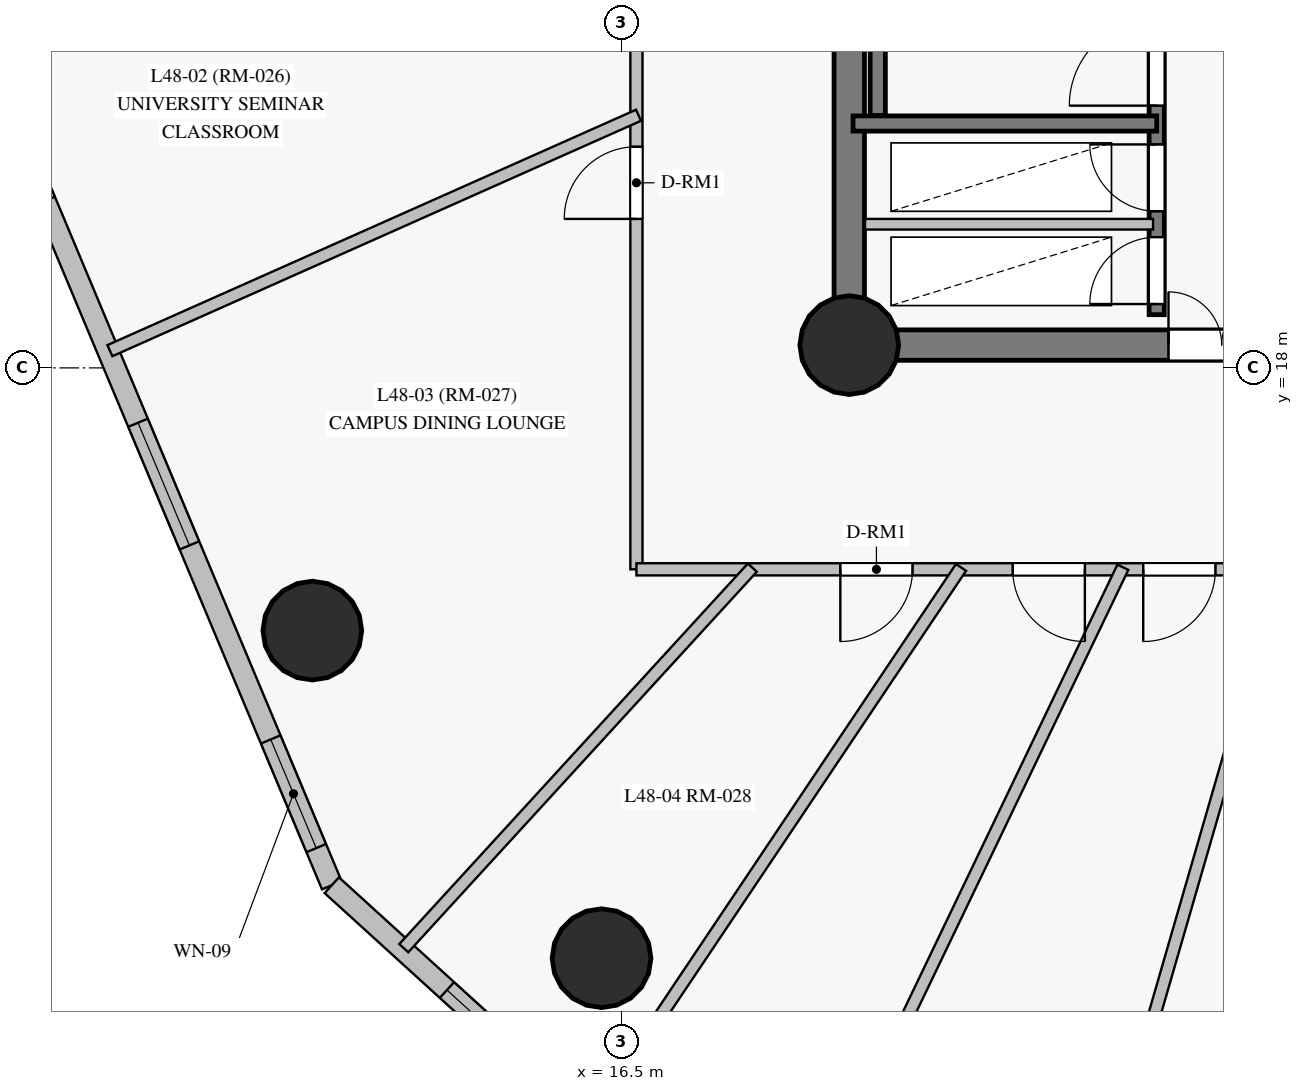
"""IFC4 building model, lengths in metres.
Left out: names, types, materials, properties, quantities, classifications, styles, units other than length and angle.
Written with IfcOpenShell. Run it as: python <this file> out.ifc"""

import sys

from ifc_helpers import new_model, si_unit, direction, frame, frame_2d, origin, origin_with_axes, origin_2d, place, context, subcontext, project, spatial, rectangle, circle, extrude, source, transform, mapped, element, fill, save


model = new_model("IFC4")
c1 = context("Model", 3, precision=1e-05, world=origin(), true_north=direction((0.0, 1.0)))
c2 = subcontext(c1, "Body", "Model", "MODEL_VIEW")
j1 = project(units=[si_unit("LENGTHUNIT", "METRE"), si_unit("PLANEANGLEUNIT", "RADIAN")], contexts=[c1])
p1 = place(None, origin())
s1 = spatial("IfcSite", under=j1, at=p1, CompositionType="ELEMENT")
p2 = place(p1, origin())
s2 = spatial("IfcBuilding", under=s1, at=p2, CompositionType="ELEMENT")
p3 = place(p2, frame((0.0, 0.0, 168.75)))
s3 = spatial("IfcBuildingStorey", under=s2, at=p3, CompositionType="ELEMENT", Elevation=168.75)
p4 = place(p3, frame((19.5, 18.3, 0.0), z_axis=(0.0, 0.0, 1.0), x_axis=(1.0, 0.0, 0.0)))
e1 = element("IfcWall", 1, at=p4, inside=s3, PredefinedType="SHEAR", context=c2, shape_type="SweptSolid", body=[
    extrude(rectangle(XDim=7.05, YDim=0.4, at=frame_2d((3.525, 0.0))), origin(), (0.0, 0.0, 1.0), 2.825),
])
p5 = place(p4, frame((4.2, 0.0, 0.0)))
e2 = element("IfcOpeningElement", 2, at=p5, cuts=e1, PredefinedType="OPENING", context=c2, shape_type="SweptSolid", body=[
    extrude(rectangle(XDim=1.4, YDim=2.2, at=frame_2d((0.7, 1.1))), frame((0.0, 0.21, 0.0), z_axis=(0.0, -1.0, 0.0), x_axis=(1.0, 0.0, 0.0)), (0.0, 0.0, 1.0), 0.42),
])
p6 = place(p3, frame((19.5, 34.7, 0.0), z_axis=(0.0, 0.0, 1.0), x_axis=(0.0, -1.0, 0.0)))
e3 = element("IfcWall", 3, at=p6, inside=s3, PredefinedType="SHEAR", context=c2, shape_type="SweptSolid", body=[
    extrude(rectangle(XDim=16.4, YDim=0.4, at=frame_2d((8.2, 0.0))), origin(), (0.0, 0.0, 1.0), 2.825),
])
p7 = place(p6, frame((3.1, 0.0, 0.0)))
e4 = element("IfcOpeningElement", 4, at=p7, cuts=e3, PredefinedType="OPENING", context=c2, shape_type="SweptSolid", body=[
    extrude(rectangle(XDim=1.1, YDim=2.15, at=frame_2d((0.55, 1.075))), frame((0.0, 0.21, 0.0), z_axis=(0.0, -1.0, 0.0), x_axis=(1.0, 0.0, 0.0)), (0.0, 0.0, 1.0), 0.42),
])
m1 = source(origin_with_axes(), c2, "Body", "SweptSolid", [
    extrude(circle(Radius=0.65, at=origin_2d()), origin(), (0.0, 0.0, 1.0), 3.05),
])
for number, where, z_axis, x_axis in (
    (5, (19.5, 18.3, 0.0), (0.0, 0.0, 1.0), (1.0, 0.0, 0.0)),
    (6, (12.436, 14.544, 0.0), (0.0, 0.0, 1.0), (1.0, 0.0, 0.0)),
    (7, (16.241, 10.234, 0.0), (0.0, 0.0, 1.0), (1.0, 0.0, 0.0)),
):
    element("IfcColumn", number, at=place(p3, frame(where, z_axis=z_axis, x_axis=x_axis)), inside=s3, PredefinedType="COLUMN", context=c2, shape_type="MappedRepresentation", body=[
        mapped(m1, transform((0.0, 0.0, 0.0), scale=1.0)),
    ])
p8 = place(p3, frame((7.391, 23.846, 0.0), z_axis=(0.0, 0.0, 1.0), x_axis=(0.386420521241, -0.922322709665, 0.0)))
e8 = element("IfcWall", 8, at=p8, inside=s3, PredefinedType="SOLIDWALL", context=c2, shape_type="SweptSolid", body=[
    extrude(rectangle(XDim=13.718, YDim=0.28, at=frame_2d((6.859, 0.0))), origin(), (0.0, 0.0, 1.0), 2.825),
])
p9 = place(p8, frame((2.206, 0.0, 0.85)))
e9 = element("IfcOpeningElement", 9, at=p9, cuts=e8, PredefinedType="OPENING", context=c2, shape_type="SweptSolid", body=[
    extrude(rectangle(XDim=1.75, YDim=1.65, at=frame_2d((0.875, 0.825))), frame((0.0, 0.15, 0.0), z_axis=(0.0, -1.0, 0.0), x_axis=(1.0, 0.0, 0.0)), (0.0, 0.0, 1.0), 0.3),
])
p10 = place(p8, frame((7.121, 0.0, 0.85)))
e10 = element("IfcOpeningElement", 10, at=p10, cuts=e8, PredefinedType="OPENING", context=c2, shape_type="SweptSolid", body=[
    extrude(rectangle(XDim=1.75, YDim=1.65, at=frame_2d((0.875, 0.825))), frame((0.0, 0.15, 0.0), z_axis=(0.0, -1.0, 0.0), x_axis=(1.0, 0.0, 0.0)), (0.0, 0.0, 1.0), 0.3),
])
p11 = place(p8, frame((11.638, 0.0, 0.85)))
e11 = element("IfcOpeningElement", 11, at=p11, cuts=e8, PredefinedType="OPENING", context=c2, shape_type="SweptSolid", body=[
    extrude(rectangle(XDim=1.55, YDim=1.65, at=frame_2d((0.775, 0.825))), frame((0.0, 0.15, 0.0), z_axis=(0.0, -1.0, 0.0), x_axis=(1.0, 0.0, 0.0)), (0.0, 0.0, 1.0), 0.3),
])
p12 = place(p3, frame((12.692, 11.194, 0.0), z_axis=(0.0, 0.0, 1.0), x_axis=(0.739668886852, -0.67297097844, 0.0)))
e12 = element("IfcWall", 12, at=p12, inside=s3, PredefinedType="SOLIDWALL", context=c2, shape_type="SweptSolid", body=[
    extrude(rectangle(XDim=9.616, YDim=0.28, at=frame_2d((4.808, 0.0))), origin(), (0.0, 0.0, 1.0), 2.825),
])
p13 = place(p12, frame((2.049, 0.0, 0.85)))
e13 = element("IfcOpeningElement", 13, at=p13, cuts=e12, PredefinedType="OPENING", context=c2, shape_type="SweptSolid", body=[
    extrude(rectangle(XDim=1.75, YDim=1.65, at=frame_2d((0.875, 0.825))), frame((0.0, 0.15, 0.0), z_axis=(0.0, -1.0, 0.0), x_axis=(1.0, 0.0, 0.0)), (0.0, 0.0, 1.0), 0.3),
])
p14 = place(p12, frame((5.365, 0.0, 0.85)))
e14 = element("IfcOpeningElement", 14, at=p14, cuts=e12, PredefinedType="OPENING", context=c2, shape_type="SweptSolid", body=[
    extrude(rectangle(XDim=1.75, YDim=1.65, at=frame_2d((0.875, 0.825))), frame((0.0, 0.15, 0.0), z_axis=(0.0, -1.0, 0.0), x_axis=(1.0, 0.0, 0.0)), (0.0, 0.0, 1.0), 0.3),
])
p15 = place(p3, frame((23.545, 18.7, 0.0), z_axis=(0.0, 0.0, 1.0), x_axis=(0.0, 1.0, 0.0)))
e15 = element("IfcWall", 15, at=p15, inside=s3, PredefinedType="SHEAR", context=c2, shape_type="SweptSolid", body=[
    extrude(rectangle(XDim=15.6, YDim=0.2, at=frame_2d((7.8, 0.0))), origin(), (0.0, 0.0, 1.0), 2.825),
])
p16 = place(p15, frame((2.75, 0.0, 0.0)))
e16 = element("IfcOpeningElement", 16, at=p16, cuts=e15, PredefinedType="OPENING", context=c2, shape_type="SweptSolid", body=[
    extrude(rectangle(XDim=1.15, YDim=2.15, at=frame_2d((0.575, 1.075))), frame((0.0, 0.11, 0.0), z_axis=(0.0, -1.0, 0.0), x_axis=(1.0, 0.0, 0.0)), (0.0, 0.0, 1.0), 0.22),
])
p17 = place(p15, frame((0.14, 0.0, 0.0)))
e17 = element("IfcOpeningElement", 17, at=p17, cuts=e15, PredefinedType="OPENING", context=c2, shape_type="SweptSolid", body=[
    extrude(rectangle(XDim=0.88, YDim=2.1, at=frame_2d((0.44, 1.05))), frame((0.0, 0.11, 0.0), z_axis=(0.0, -1.0, 0.0), x_axis=(1.0, 0.0, 0.0)), (0.0, 0.0, 1.0), 0.22),
])
p18 = place(p15, frame((1.36, 0.0, 0.0)))
e18 = element("IfcOpeningElement", 18, at=p18, cuts=e15, PredefinedType="OPENING", context=c2, shape_type="SweptSolid", body=[
    extrude(rectangle(XDim=0.88, YDim=2.1, at=frame_2d((0.44, 1.05))), frame((0.0, 0.11, 0.0), z_axis=(0.0, -1.0, 0.0), x_axis=(1.0, 0.0, 0.0)), (0.0, 0.0, 1.0), 0.22),
])
p19 = place(p15, frame((12.1, 0.0, 0.0)))
e19 = element("IfcOpeningElement", 19, at=p19, cuts=e15, PredefinedType="OPENING", context=c2, shape_type="SweptSolid", body=[
    extrude(rectangle(XDim=1.12, YDim=2.15, at=frame_2d((0.56, 1.075))), frame((0.0, 0.11, 0.0), z_axis=(0.0, -1.0, 0.0), x_axis=(1.0, 0.0, 0.0)), (0.0, 0.0, 1.0), 0.22),
])
p20 = place(p15, frame((14.05, 0.0, 0.0)))
e20 = element("IfcOpeningElement", 20, at=p20, cuts=e15, PredefinedType="OPENING", context=c2, shape_type="SweptSolid", body=[
    extrude(rectangle(XDim=1.12, YDim=2.15, at=frame_2d((0.56, 1.075))), frame((0.0, 0.11, 0.0), z_axis=(0.0, -1.0, 0.0), x_axis=(1.0, 0.0, 0.0)), (0.0, 0.0, 1.0), 0.22),
])
p21 = place(p3, frame((19.875, 21.32, 0.0), z_axis=(0.0, 0.0, 1.0), x_axis=(0.0, 1.0, 0.0)))
e21 = element("IfcWall", 21, at=p21, inside=s3, PredefinedType="SHEAR", context=c2, shape_type="SweptSolid", body=[
    extrude(rectangle(XDim=7.5, YDim=0.2, at=frame_2d((3.75, 0.0))), origin(), (0.0, 0.0, 1.0), 2.825),
])
p22 = place(p3, frame((19.55, 21.215, 0.0), z_axis=(0.0, 0.0, 1.0), x_axis=(1.0, 0.0, 0.0)))
e22 = element("IfcWall", 22, at=p22, inside=s3, PredefinedType="SHEAR", context=c2, shape_type="SweptSolid", body=[
    extrude(rectangle(XDim=3.995, YDim=0.2, at=frame_2d((1.998, 0.0))), origin(), (0.0, 0.0, 1.0), 2.825),
])
p23 = place(p3, frame((16.7, 15.35, 0.0), z_axis=(0.0, 0.0, 1.0), x_axis=(0.0, 1.0, 0.0)))
e23 = element("IfcWall", 23, at=p23, inside=s3, PredefinedType="PARTITIONING", context=c2, shape_type="SweptSolid", body=[
    extrude(rectangle(XDim=22.3, YDim=0.16, at=frame_2d((11.15, 0.0))), origin(), (0.0, 0.0, 1.0), 2.275),
])
p24 = place(p23, frame((11.383, 0.0, 0.0)))
e24 = element("IfcOpeningElement", 24, at=p24, cuts=e23, PredefinedType="OPENING", context=c2, shape_type="SweptSolid", body=[
    extrude(rectangle(XDim=0.86, YDim=2.1, at=frame_2d((0.43, 1.05))), frame((0.0, 0.09, 0.0), z_axis=(0.0, -1.0, 0.0), x_axis=(1.0, 0.0, 0.0)), (0.0, 0.0, 1.0), 0.18),
])
p25 = place(p23, frame((7.33, 0.0, 0.0)))
e25 = element("IfcOpeningElement", 25, at=p25, cuts=e23, PredefinedType="OPENING", context=c2, shape_type="SweptSolid", body=[
    extrude(rectangle(XDim=0.96, YDim=2.15, at=frame_2d((0.48, 1.075))), frame((0.0, 0.09, 0.0), z_axis=(0.0, -1.0, 0.0), x_axis=(1.0, 0.0, 0.0)), (0.0, 0.0, 1.0), 0.18),
])
p26 = place(p23, frame((4.61, 0.0, 0.0)))
e26 = element("IfcOpeningElement", 26, at=p26, cuts=e23, PredefinedType="OPENING", context=c2, shape_type="SweptSolid", body=[
    extrude(rectangle(XDim=0.95, YDim=2.15, at=frame_2d((0.475, 1.075))), frame((0.0, 0.09, 0.0), z_axis=(0.0, -1.0, 0.0), x_axis=(1.0, 0.0, 0.0)), (0.0, 0.0, 1.0), 0.18),
])
p27 = place(p23, frame((16.99, 0.0, 0.0)))
e27 = element("IfcOpeningElement", 27, at=p27, cuts=e23, PredefinedType="OPENING", context=c2, shape_type="SweptSolid", body=[
    extrude(rectangle(XDim=0.95, YDim=2.15, at=frame_2d((0.475, 1.075))), frame((0.0, 0.09, 0.0), z_axis=(0.0, -1.0, 0.0), x_axis=(1.0, 0.0, 0.0)), (0.0, 0.0, 1.0), 0.18),
])
p28 = place(p23, frame((15.86, 0.0, 0.0)))
e28 = element("IfcOpeningElement", 28, at=p28, cuts=e23, PredefinedType="OPENING", context=c2, shape_type="SweptSolid", body=[
    extrude(rectangle(XDim=0.95, YDim=2.15, at=frame_2d((0.475, 1.075))), frame((0.0, 0.09, 0.0), z_axis=(0.0, -1.0, 0.0), x_axis=(1.0, 0.0, 0.0)), (0.0, 0.0, 1.0), 0.18),
])
p29 = place(p23, frame((14.02, 0.0, 0.0)))
e29 = element("IfcOpeningElement", 29, at=p29, cuts=e23, PredefinedType="OPENING", context=c2, shape_type="SweptSolid", body=[
    extrude(rectangle(XDim=0.95, YDim=2.15, at=frame_2d((0.475, 1.075))), frame((0.0, 0.09, 0.0), z_axis=(0.0, -1.0, 0.0), x_axis=(1.0, 0.0, 0.0)), (0.0, 0.0, 1.0), 0.18),
])
p30 = place(p3, frame((26.493, 15.38, 0.0), z_axis=(0.0, 0.0, 1.0), x_axis=(-0.172341150269, -0.985037323112, 0.0)))
e30 = element("IfcWall", 30, at=p30, inside=s3, PredefinedType="PARTITIONING", context=c2, shape_type="SweptSolid", body=[
    extrude(rectangle(XDim=11.941, YDim=0.16, at=frame_2d((5.97, 0.0))), origin(), (0.0, 0.0, 1.0), 2.275),
])
p31 = place(p30, frame((5.54, 0.0, 0.0)))
e31 = element("IfcOpeningElement", 31, at=p31, cuts=e30, PredefinedType="OPENING", context=c2, shape_type="SweptSolid", body=[
    extrude(rectangle(XDim=0.86, YDim=2.04, at=frame_2d((0.43, 1.02))), frame((0.0, 0.09, 0.0), z_axis=(0.0, -1.0, 0.0), x_axis=(1.0, 0.0, 0.0)), (0.0, 0.0, 1.0), 0.18),
])
p32 = place(p3, frame((25.219, 15.379, 0.0), z_axis=(0.0, 0.0, 1.0), x_axis=(-0.277990744835, -0.960583752614, 0.0)))
e32 = element("IfcWall", 32, at=p32, inside=s3, PredefinedType="PARTITIONING", context=c2, shape_type="SweptSolid", body=[
    extrude(rectangle(XDim=11.622, YDim=0.16, at=frame_2d((5.811, 0.0))), origin(), (0.0, 0.0, 1.0), 2.825),
])
p33 = place(p3, frame((27.55, 15.35, 0.0), z_axis=(0.0, 0.0, 1.0), x_axis=(-1.0, 0.0, 0.0)))
e33 = element("IfcWall", 33, at=p33, inside=s3, PredefinedType="PARTITIONING", context=c2, shape_type="SweptSolid", body=[
    extrude(rectangle(XDim=10.85, YDim=0.16, at=frame_2d((5.425, 0.0))), origin(), (0.0, 0.0, 1.0), 2.375),
])
p34 = place(p33, frame((7.218, 0.0, 0.0)))
e34 = element("IfcOpeningElement", 34, at=p34, cuts=e33, PredefinedType="OPENING", context=c2, shape_type="SweptSolid", body=[
    extrude(rectangle(XDim=0.95, YDim=2.15, at=frame_2d((0.475, 1.075))), frame((0.0, 0.09, 0.0), z_axis=(0.0, -1.0, 0.0), x_axis=(1.0, 0.0, 0.0)), (0.0, 0.0, 1.0), 0.18),
])
p35 = place(p33, frame((4.95, 0.0, 0.0)))
e35 = element("IfcOpeningElement", 35, at=p35, cuts=e33, PredefinedType="OPENING", context=c2, shape_type="SweptSolid", body=[
    extrude(rectangle(XDim=0.95, YDim=2.15, at=frame_2d((0.475, 1.075))), frame((0.0, 0.09, 0.0), z_axis=(0.0, -1.0, 0.0), x_axis=(1.0, 0.0, 0.0)), (0.0, 0.0, 1.0), 0.18),
])
p36 = place(p33, frame((3.232, 0.0, 0.0)))
e36 = element("IfcOpeningElement", 36, at=p36, cuts=e33, PredefinedType="OPENING", context=c2, shape_type="SweptSolid", body=[
    extrude(rectangle(XDim=0.95, YDim=2.15, at=frame_2d((0.475, 1.075))), frame((0.0, 0.09, 0.0), z_axis=(0.0, -1.0, 0.0), x_axis=(1.0, 0.0, 0.0)), (0.0, 0.0, 1.0), 0.18),
])
p37 = place(p3, frame((23.1, 15.377, 0.0), z_axis=(0.0, 0.0, 1.0), x_axis=(-0.432373169731, -0.901694761045, 0.0)))
e37 = element("IfcWall", 37, at=p37, inside=s3, PredefinedType="PARTITIONING", context=c2, shape_type="SweptSolid", body=[
    extrude(rectangle(XDim=10.513, YDim=0.16, at=frame_2d((5.256, 0.0))), origin(), (0.0, 0.0, 1.0), 2.825),
])
p38 = place(p3, frame((20.97, 15.375, 0.0), z_axis=(0.0, 0.0, 1.0), x_axis=(-0.556788758436, -0.830654126866, 0.0)))
e38 = element("IfcWall", 38, at=p38, inside=s3, PredefinedType="PARTITIONING", context=c2, shape_type="SweptSolid", body=[
    extrude(rectangle(XDim=8.733, YDim=0.16, at=frame_2d((4.366, 0.0))), origin(), (0.0, 0.0, 1.0), 2.825),
])
p39 = place(p3, frame((16.727, 21.323, 0.0), z_axis=(0.0, 0.0, 1.0), x_axis=(-0.913525664491, -0.406781096311, 0.0)))
e39 = element("IfcWall", 39, at=p39, inside=s3, PredefinedType="PARTITIONING", context=c2, shape_type="SweptSolid", body=[
    extrude(rectangle(XDim=7.613, YDim=0.16, at=frame_2d((3.806, 0.0))), origin(), (0.0, 0.0, 1.0), 2.825),
])
p40 = place(p3, frame((18.225, 15.372, 0.0), z_axis=(0.0, 0.0, 1.0), x_axis=(-0.675483575818, -0.737375032667, 0.0)))
e40 = element("IfcWall", 40, at=p40, inside=s3, PredefinedType="PARTITIONING", context=c2, shape_type="SweptSolid", body=[
    extrude(rectangle(XDim=6.789, YDim=0.16, at=frame_2d((3.395, 0.0))), origin(), (0.0, 0.0, 1.0), 2.275),
])
p41 = place(p3, frame((19.707, 19.89, 0.0), z_axis=(0.0, 0.0, 1.0), x_axis=(1.0, 0.0, 0.0)))
e41 = element("IfcWall", 41, at=p41, inside=s3, PredefinedType="PARTITIONING", context=c2, shape_type="SweptSolid", body=[
    extrude(rectangle(XDim=3.79, YDim=0.14, at=frame_2d((1.895, 0.0))), origin(), (0.0, 0.0, 1.0), 2.825),
])
m2 = source(origin_with_axes(), c2, "Body", "SweptSolid", [
    extrude(rectangle(XDim=1.75, YDim=1.65, at=frame_2d((0.875, 0.825))), frame((0.0, 0.03, 0.0), z_axis=(0.0, -1.0, 0.0), x_axis=(1.0, 0.0, 0.0)), (0.0, 0.0, 1.0), 0.06),
])
p42 = place(p10, origin())
e42 = element("IfcWindow", 42, at=p42, inside=s3, PartitioningType="SINGLE_PANEL", PredefinedType="WINDOW", context=c2, shape_type="MappedRepresentation", body=[
    mapped(m2, transform((0.0, 0.0, 0.0), scale=1.0)),
])
fill(e10, e42)
m3 = source(origin_with_axes(), c2, "Body", "SweptSolid", [
    extrude(rectangle(XDim=1.55, YDim=1.65, at=frame_2d((0.775, 0.825))), frame((0.0, 0.03, 0.0), z_axis=(0.0, -1.0, 0.0), x_axis=(1.0, 0.0, 0.0)), (0.0, 0.0, 1.0), 0.06),
])
p43 = place(p11, origin())
e43 = element("IfcWindow", 43, at=p43, inside=s3, PartitioningType="SINGLE_PANEL", PredefinedType="WINDOW", context=c2, shape_type="MappedRepresentation", body=[
    mapped(m3, transform((0.0, 0.0, 0.0), scale=1.0)),
])
fill(e11, e43)
p44 = place(p13, origin())
e44 = element("IfcWindow", 44, at=p44, inside=s3, PartitioningType="SINGLE_PANEL", PredefinedType="WINDOW", context=c2, shape_type="MappedRepresentation", body=[
    mapped(m2, transform((0.0, 0.0, 0.0), scale=1.0)),
])
fill(e13, e44)
m4 = source(origin_with_axes(), c2, "Body", "SweptSolid", [
    extrude(rectangle(XDim=1.15, YDim=2.15, at=frame_2d((0.575, 1.075))), frame((0.0, 0.025, 0.0), z_axis=(0.0, -1.0, 0.0), x_axis=(1.0, 0.0, 0.0)), (0.0, 0.0, 1.0), 0.05),
])
p45 = place(p16, origin())
e45 = element("IfcDoor", 45, at=p45, inside=s3, OperationType="SINGLE_SWING_LEFT", PredefinedType="DOOR", context=c2, shape_type="MappedRepresentation", body=[
    mapped(m4, transform((0.0, 0.0, 0.0), scale=1.0)),
])
fill(e16, e45)
m5 = source(origin_with_axes(), c2, "Body", "SweptSolid", [
    extrude(rectangle(XDim=0.88, YDim=2.1, at=frame_2d((0.44, 1.05))), frame((0.0, 0.025, 0.0), z_axis=(0.0, -1.0, 0.0), x_axis=(1.0, 0.0, 0.0)), (0.0, 0.0, 1.0), 0.05),
])
p46 = place(p17, origin())
e46 = element("IfcDoor", 46, at=p46, inside=s3, OperationType="SINGLE_SWING_LEFT", PredefinedType="DOOR", context=c2, shape_type="MappedRepresentation", body=[
    mapped(m5, transform((0.0, 0.0, 0.0), scale=1.0)),
])
fill(e17, e46)
p47 = place(p18, origin())
e47 = element("IfcDoor", 47, at=p47, inside=s3, OperationType="SINGLE_SWING_RIGHT", PredefinedType="DOOR", context=c2, shape_type="MappedRepresentation", body=[
    mapped(m5, transform((0.0, 0.0, 0.0), scale=1.0)),
])
fill(e18, e47)
m6 = source(origin_with_axes(), c2, "Body", "SweptSolid", [
    extrude(rectangle(XDim=1.4, YDim=2.2, at=frame_2d((0.7, 1.1))), frame((0.0, 0.025, 0.0), z_axis=(0.0, -1.0, 0.0), x_axis=(1.0, 0.0, 0.0)), (0.0, 0.0, 1.0), 0.05),
])
p48 = place(p5, origin())
e48 = element("IfcDoor", 48, at=p48, inside=s3, OperationType="DOUBLE_DOOR_SINGLE_SWING", PredefinedType="DOOR", context=c2, shape_type="MappedRepresentation", body=[
    mapped(m6, transform((0.0, 0.0, 0.0), scale=1.0)),
])
fill(e2, e48)
m7 = source(origin_with_axes(), c2, "Body", "SweptSolid", [
    extrude(rectangle(XDim=0.95, YDim=2.15, at=frame_2d((0.475, 1.075))), frame((0.0, 0.025, 0.0), z_axis=(0.0, -1.0, 0.0), x_axis=(1.0, 0.0, 0.0)), (0.0, 0.0, 1.0), 0.05),
])
p49 = place(p26, origin())
e49 = element("IfcDoor", 49, at=p49, inside=s3, OperationType="SINGLE_SWING_LEFT", PredefinedType="DOOR", context=c2, shape_type="MappedRepresentation", body=[
    mapped(m7, transform((0.0, 0.0, 0.0), scale=1.0)),
])
fill(e26, e49)
p50 = place(p34, origin())
e50 = element("IfcDoor", 50, at=p50, inside=s3, OperationType="SINGLE_SWING_RIGHT", PredefinedType="DOOR", context=c2, shape_type="MappedRepresentation", body=[
    mapped(m7, transform((0.0, 0.0, 0.0), scale=1.0)),
])
fill(e34, e50)
p51 = place(p35, origin())
e51 = element("IfcDoor", 51, at=p51, inside=s3, OperationType="SINGLE_SWING_LEFT", PredefinedType="DOOR", context=c2, shape_type="MappedRepresentation", body=[
    mapped(m7, transform((0.0, 0.0, 0.0), scale=1.0)),
])
fill(e35, e51)
p52 = place(p36, origin())
e52 = element("IfcDoor", 52, at=p52, inside=s3, OperationType="SINGLE_SWING_RIGHT", PredefinedType="DOOR", context=c2, shape_type="MappedRepresentation", body=[
    mapped(m7, transform((0.0, 0.0, 0.0), scale=1.0)),
])
fill(e36, e52)
save(model, sys.argv[1])
